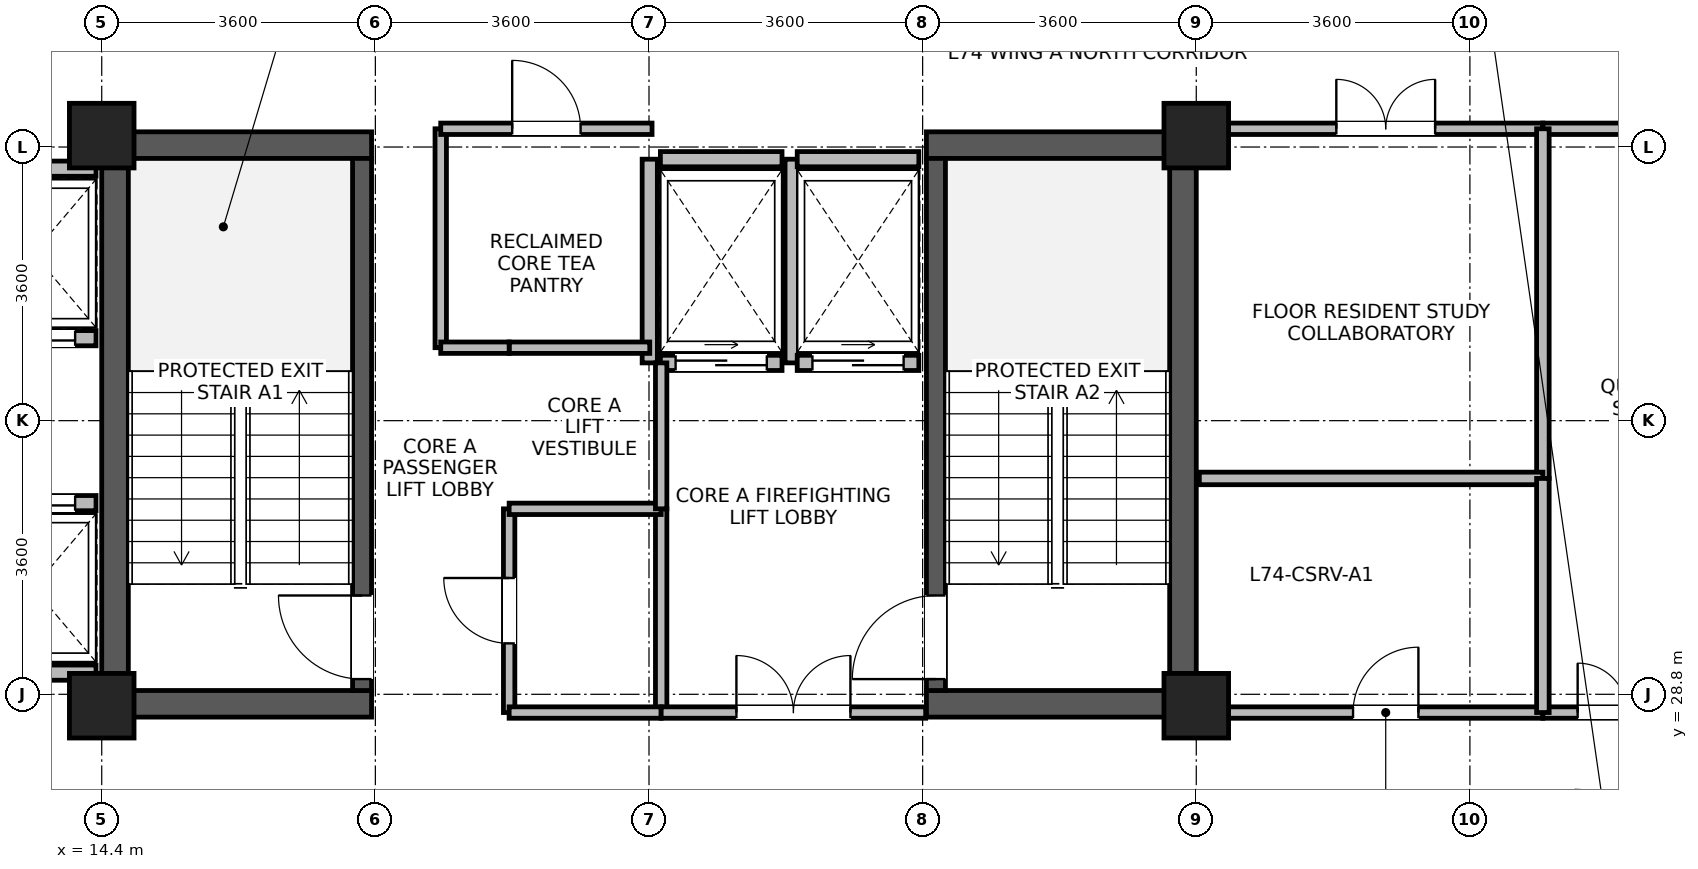
"""IFC4 building model, lengths in metres.
Left out: names, types, materials, properties, quantities, classifications, styles, units other than length and angle.
Written with IfcOpenShell. Run it as: python <this file> out.ifc"""

import sys

from ifc_helpers import new_model, si_unit, direction, frame, frame_2d, origin, origin_2d, place, context, subcontext, project, spatial, rectangle, extrude, source, transform, mapped, element, fill, save


model = new_model("IFC4")
c1 = context("Model", 3, precision=1e-05, world=origin(), true_north=direction((0.0, 1.0)))
c2 = subcontext(c1, "Body", "Model", "MODEL_VIEW")
j1 = project(units=[si_unit("LENGTHUNIT", "METRE"), si_unit("PLANEANGLEUNIT", "RADIAN")], contexts=[c1])
p1 = place(None, origin())
s1 = spatial("IfcSite", under=j1, at=p1, CompositionType="ELEMENT")
p2 = place(p1, origin())
s2 = spatial("IfcBuilding", under=s1, at=p2, CompositionType="ELEMENT")
p3 = place(p2, frame((0.0, 0.0, 286.9)))
s3 = spatial("IfcBuildingStorey", under=s2, at=p3, CompositionType="ELEMENT", Elevation=286.9)
for number, where, z_axis, x_axis in (
    (1, (14.575, 28.5, 0.0), (0.0, 0.0, 1.0), (0.0, 1.0, 0.0)),
    (2, (28.625, 28.5, 0.0), (0.0, 0.0, 1.0), (0.0, 1.0, 0.0)),
):
    element("IfcWall", number, at=place(p3, frame(where, z_axis=z_axis, x_axis=x_axis)), inside=s3, PredefinedType="SHEAR", context=c2, shape_type="SweptSolid", body=[
        extrude(rectangle(XDim=7.7, YDim=0.35, at=frame_2d((3.85, 0.0))), origin(), (0.0, 0.0, 1.0), 3.475),
    ])
for number, where, z_axis, x_axis in (
    (3, (14.75, 28.675, 0.0), (0.0, 0.0, 1.0), (1.0, 0.0, 0.0)),
    (4, (25.25, 28.675, 0.0), (0.0, 0.0, 1.0), (1.0, 0.0, 0.0)),
    (5, (14.75, 36.025, 0.0), (0.0, 0.0, 1.0), (1.0, 0.0, 0.0)),
    (6, (25.25, 36.025, 0.0), (0.0, 0.0, 1.0), (1.0, 0.0, 0.0)),
):
    element("IfcWall", number, at=place(p3, frame(where, z_axis=z_axis, x_axis=x_axis)), inside=s3, PredefinedType="SHEAR", context=c2, shape_type="SweptSolid", body=[
        extrude(rectangle(XDim=3.2, YDim=0.35, at=frame_2d((1.6, 0.0))), origin(), (0.0, 0.0, 1.0), 3.475),
    ])
p4 = place(p3, frame((17.825, 28.85, 0.0), z_axis=(0.0, 0.0, 1.0), x_axis=(0.0, 1.0, 0.0)))
e7 = element("IfcWall", 7, at=p4, inside=s3, PredefinedType="SHEAR", context=c2, shape_type="SweptSolid", body=[
    extrude(rectangle(XDim=7.0, YDim=0.25, at=frame_2d((3.5, 0.0))), origin(), (0.0, 0.0, 1.0), 3.475),
])
p5 = place(p4, frame((0.15, 0.0, 0.0)))
e8 = element("IfcOpeningElement", 8, at=p5, cuts=e7, PredefinedType="OPENING", context=c2, shape_type="SweptSolid", body=[
    extrude(rectangle(XDim=1.1, YDim=2.08, at=frame_2d((0.55, 1.04))), frame((0.0, 0.135, 0.0), z_axis=(0.0, -1.0, 0.0), x_axis=(1.0, 0.0, 0.0)), (0.0, 0.0, 1.0), 0.27),
])
p6 = place(p3, frame((25.375, 28.85, 0.0), z_axis=(0.0, 0.0, 1.0), x_axis=(0.0, 1.0, 0.0)))
e9 = element("IfcWall", 9, at=p6, inside=s3, PredefinedType="SHEAR", context=c2, shape_type="SweptSolid", body=[
    extrude(rectangle(XDim=7.0, YDim=0.25, at=frame_2d((3.5, 0.0))), origin(), (0.0, 0.0, 1.0), 3.475),
])
p7 = place(p6, frame((0.15, 0.0, 0.0)))
e10 = element("IfcOpeningElement", 10, at=p7, cuts=e9, PredefinedType="OPENING", context=c2, shape_type="SweptSolid", body=[
    extrude(rectangle(XDim=1.1, YDim=2.08, at=frame_2d((0.55, 1.04))), frame((0.0, 0.135, 0.0), z_axis=(0.0, -1.0, 0.0), x_axis=(1.0, 0.0, 0.0)), (0.0, 0.0, 1.0), 0.27),
])
m1 = source(origin(), c2, "Body", "SweptSolid", [
    extrude(rectangle(XDim=0.85, YDim=0.85, at=origin_2d()), origin(), (0.0, 0.0, 1.0), 3.7),
])
for number, where, z_axis, x_axis in (
    (11, (14.4, 28.65, 0.0), (0.0, 0.0, 1.0), (1.0, 0.0, 0.0)),
    (12, (14.4, 36.15, 0.0), (0.0, 0.0, 1.0), (1.0, 0.0, 0.0)),
    (13, (28.8, 28.65, 0.0), (0.0, 0.0, 1.0), (1.0, 0.0, 0.0)),
    (14, (28.8, 36.15, 0.0), (0.0, 0.0, 1.0), (1.0, 0.0, 0.0)),
):
    element("IfcColumn", number, at=place(p3, frame(where, z_axis=z_axis, x_axis=x_axis)), inside=s3, PredefinedType="COLUMN", context=c2, shape_type="MappedRepresentation", body=[
        mapped(m1, transform((0.0, 0.0, 0.0), x_axis=(1.0, 0.0, 0.0), y_axis=(0.0, 1.0, 0.0), z_axis=(0.0, 0.0, 1.0), scale=1.0)),
    ])
p8 = place(p3, frame((12.675, 33.485, 0.0), z_axis=(0.0, 0.0, 1.0), x_axis=(1.0, 0.0, 0.0)))
e15 = element("IfcWall", 15, at=p8, inside=s3, PredefinedType="PARTITIONING", context=c2, shape_type="SweptSolid", body=[
    extrude(rectangle(XDim=1.65, YDim=0.2, at=frame_2d((0.825, 0.0))), origin(), (0.0, 0.0, 1.0), 3.455),
])
p9 = place(p8, frame((0.275, 0.0, 0.0)))
e16 = element("IfcOpeningElement", 16, at=p9, cuts=e15, PredefinedType="OPENING", context=c2, shape_type="SweptSolid", body=[
    extrude(rectangle(XDim=1.1, YDim=2.12, at=frame_2d((0.55, 1.06))), frame((0.0, 0.11, 0.0), z_axis=(0.0, -1.0, 0.0), x_axis=(1.0, 0.0, 0.0)), (0.0, 0.0, 1.0), 0.22),
])
for number, where, z_axis, x_axis in (
    (17, (12.675, 35.715, 0.0), (0.0, 0.0, 1.0), (1.0, 0.0, 0.0)),
    (18, (12.675, 29.085, 0.0), (0.0, 0.0, 1.0), (1.0, 0.0, 0.0)),
):
    element("IfcWall", number, at=place(p3, frame(where, z_axis=z_axis, x_axis=x_axis)), inside=s3, PredefinedType="PARTITIONING", context=c2, shape_type="SweptSolid", body=[
        extrude(rectangle(XDim=1.65, YDim=0.2, at=frame_2d((0.825, 0.0))), origin(), (0.0, 0.0, 1.0), 3.455),
    ])
p10 = place(p3, frame((12.675, 31.315, 0.0), z_axis=(0.0, 0.0, 1.0), x_axis=(1.0, 0.0, 0.0)))
e19 = element("IfcWall", 19, at=p10, inside=s3, PredefinedType="PARTITIONING", context=c2, shape_type="SweptSolid", body=[
    extrude(rectangle(XDim=1.65, YDim=0.2, at=frame_2d((0.825, 0.0))), origin(), (0.0, 0.0, 1.0), 3.455),
])
p11 = place(p10, frame((0.275, 0.0, 0.0)))
e20 = element("IfcOpeningElement", 20, at=p11, cuts=e19, PredefinedType="OPENING", context=c2, shape_type="SweptSolid", body=[
    extrude(rectangle(XDim=1.1, YDim=2.12, at=frame_2d((0.55, 1.06))), frame((0.0, 0.11, 0.0), z_axis=(0.0, -1.0, 0.0), x_axis=(1.0, 0.0, 0.0)), (0.0, 0.0, 1.0), 0.22),
])
p12 = place(p3, frame((21.75, 33.16, 0.0), z_axis=(0.0, 0.0, 1.0), x_axis=(1.0, 0.0, 0.0)))
e21 = element("IfcWall", 21, at=p12, inside=s3, PredefinedType="PARTITIONING", context=c2, shape_type="SweptSolid", body=[
    extrude(rectangle(XDim=1.6, YDim=0.2, at=frame_2d((0.8, 0.0))), origin(), (0.0, 0.0, 1.0), 3.455),
])
p13 = place(p12, frame((0.2, 0.0, 0.0)))
e22 = element("IfcOpeningElement", 22, at=p13, cuts=e21, PredefinedType="OPENING", context=c2, shape_type="SweptSolid", body=[
    extrude(rectangle(XDim=1.2, YDim=2.12, at=frame_2d((0.6, 1.06))), frame((0.0, 0.11, 0.0), z_axis=(0.0, -1.0, 0.0), x_axis=(1.0, 0.0, 0.0)), (0.0, 0.0, 1.0), 0.22),
])
p14 = place(p3, frame((21.75, 35.84, 0.0), z_axis=(0.0, 0.0, 1.0), x_axis=(1.0, 0.0, 0.0)))
e23 = element("IfcWall", 23, at=p14, inside=s3, PredefinedType="PARTITIONING", context=c2, shape_type="SweptSolid", body=[
    extrude(rectangle(XDim=1.6, YDim=0.2, at=frame_2d((0.8, 0.0))), origin(), (0.0, 0.0, 1.0), 2.555),
])
for number, where, z_axis, x_axis in (
    (24, (21.61, 33.16, 0.0), (0.0, 0.0, 1.0), (0.0, 1.0, 0.0)),
    (25, (23.49, 33.16, 0.0), (0.0, 0.0, 1.0), (0.0, 1.0, 0.0)),
):
    element("IfcWall", number, at=place(p3, frame(where, z_axis=z_axis, x_axis=x_axis)), inside=s3, PredefinedType="PARTITIONING", context=c2, shape_type="SweptSolid", body=[
        extrude(rectangle(XDim=2.68, YDim=0.2, at=frame_2d((1.34, 0.0))), origin(), (0.0, 0.0, 1.0), 3.455),
    ])
p15 = place(p3, frame((23.55, 33.16, 0.0), z_axis=(0.0, 0.0, 1.0), x_axis=(1.0, 0.0, 0.0)))
e26 = element("IfcWall", 26, at=p15, inside=s3, PredefinedType="PARTITIONING", context=c2, shape_type="SweptSolid", body=[
    extrude(rectangle(XDim=1.6, YDim=0.2, at=frame_2d((0.8, 0.0))), origin(), (0.0, 0.0, 1.0), 3.455),
])
p16 = place(p15, frame((0.2, 0.0, 0.0)))
e27 = element("IfcOpeningElement", 27, at=p16, cuts=e26, PredefinedType="OPENING", context=c2, shape_type="SweptSolid", body=[
    extrude(rectangle(XDim=1.2, YDim=2.12, at=frame_2d((0.6, 1.06))), frame((0.0, 0.11, 0.0), z_axis=(0.0, -1.0, 0.0), x_axis=(1.0, 0.0, 0.0)), (0.0, 0.0, 1.0), 0.22),
])
p17 = place(p3, frame((23.55, 35.84, 0.0), z_axis=(0.0, 0.0, 1.0), x_axis=(1.0, 0.0, 0.0)))
e28 = element("IfcWall", 28, at=p17, inside=s3, PredefinedType="PARTITIONING", context=c2, shape_type="SweptSolid", body=[
    extrude(rectangle(XDim=1.6, YDim=0.2, at=frame_2d((0.8, 0.0))), origin(), (0.0, 0.0, 1.0), 2.555),
])
p18 = place(p3, frame((29.225, 28.56, 0.0), z_axis=(0.0, 0.0, 1.0), x_axis=(1.0, 0.0, 0.0)))
e29 = element("IfcWall", 29, at=p18, inside=s3, PredefinedType="PARTITIONING", context=c2, shape_type="SweptSolid", body=[
    extrude(rectangle(XDim=4.135, YDim=0.15, at=frame_2d((2.067, 0.0))), origin(), (0.0, 0.0, 1.0), 2.905),
])
p19 = place(p18, frame((1.637, 0.0, 0.0)))
e30 = element("IfcOpeningElement", 30, at=p19, cuts=e29, PredefinedType="OPENING", context=c2, shape_type="SweptSolid", body=[
    extrude(rectangle(XDim=0.86, YDim=2.02, at=frame_2d((0.43, 1.01))), frame((0.0, 0.085, 0.0), z_axis=(0.0, -1.0, 0.0), x_axis=(1.0, 0.0, 0.0)), (0.0, 0.0, 1.0), 0.17),
])
p20 = place(p3, frame((29.225, 36.24, 0.0), z_axis=(0.0, 0.0, 1.0), x_axis=(1.0, 0.0, 0.0)))
e31 = element("IfcWall", 31, at=p20, inside=s3, PredefinedType="PARTITIONING", context=c2, shape_type="SweptSolid", body=[
    extrude(rectangle(XDim=4.135, YDim=0.15, at=frame_2d((2.067, 0.0))), origin(), (0.0, 0.0, 1.0), 2.905),
])
p21 = place(p20, frame((1.417, 0.0, 0.0)))
e32 = element("IfcOpeningElement", 32, at=p21, cuts=e31, PredefinedType="OPENING", context=c2, shape_type="SweptSolid", body=[
    extrude(rectangle(XDim=1.3, YDim=2.12, at=frame_2d((0.65, 1.06))), frame((0.0, 0.085, 0.0), z_axis=(0.0, -1.0, 0.0), x_axis=(1.0, 0.0, 0.0)), (0.0, 0.0, 1.0), 0.17),
])
p22 = place(p3, frame((33.36, 28.56, 0.0), z_axis=(0.0, 0.0, 1.0), x_axis=(1.0, 0.0, 0.0)))
e33 = element("IfcWall", 33, at=p22, inside=s3, PredefinedType="PARTITIONING", context=c2, shape_type="SweptSolid", body=[
    extrude(rectangle(XDim=2.215, YDim=0.15, at=frame_2d((1.107, 0.0))), origin(), (0.0, 0.0, 1.0), 2.905),
])
p23 = place(p22, frame((0.458, 0.0, 0.0)))
e34 = element("IfcOpeningElement", 34, at=p23, cuts=e33, PredefinedType="OPENING", context=c2, shape_type="SweptSolid", body=[
    extrude(rectangle(XDim=1.3, YDim=2.12, at=frame_2d((0.65, 1.06))), frame((0.0, 0.085, 0.0), z_axis=(0.0, -1.0, 0.0), x_axis=(1.0, 0.0, 0.0)), (0.0, 0.0, 1.0), 0.17),
])
p24 = place(p3, frame((33.36, 36.24, 0.0), z_axis=(0.0, 0.0, 1.0), x_axis=(1.0, 0.0, 0.0)))
e35 = element("IfcWall", 35, at=p24, inside=s3, PredefinedType="PARTITIONING", context=c2, shape_type="SweptSolid", body=[
    extrude(rectangle(XDim=2.215, YDim=0.15, at=frame_2d((1.107, 0.0))), origin(), (0.0, 0.0, 1.0), 2.905),
])
p25 = place(p3, frame((18.86, 33.36, 0.0), z_axis=(0.0, 0.0, 1.0), x_axis=(0.0, 1.0, 0.0)))
e36 = element("IfcWall", 36, at=p25, inside=s3, PredefinedType="PARTITIONING", context=c2, shape_type="SweptSolid", body=[
    extrude(rectangle(XDim=2.88, YDim=0.15, at=frame_2d((1.44, 0.0))), origin(), (0.0, 0.0, 1.0), 3.455),
])
p26 = place(p3, frame((18.86, 36.24, 0.0), z_axis=(0.0, 0.0, 1.0), x_axis=(1.0, 0.0, 0.0)))
e37 = element("IfcWall", 37, at=p26, inside=s3, PredefinedType="PARTITIONING", context=c2, shape_type="SweptSolid", body=[
    extrude(rectangle(XDim=2.78, YDim=0.15, at=frame_2d((1.39, 0.0))), origin(), (0.0, 0.0, 1.0), 2.555),
])
p27 = place(p26, frame((0.94, 0.0, 0.0)))
e38 = element("IfcOpeningElement", 38, at=p27, cuts=e37, PredefinedType="OPENING", context=c2, shape_type="SweptSolid", body=[
    extrude(rectangle(XDim=0.9, YDim=2.08, at=frame_2d((0.45, 1.04))), frame((0.0, 0.085, 0.0), z_axis=(0.0, -1.0, 0.0), x_axis=(1.0, 0.0, 0.0)), (0.0, 0.0, 1.0), 0.17),
])
p28 = place(p3, frame((19.76, 28.56, 0.0), z_axis=(0.0, 0.0, 1.0), x_axis=(0.0, 1.0, 0.0)))
e39 = element("IfcWall", 39, at=p28, inside=s3, PredefinedType="PARTITIONING", context=c2, shape_type="SweptSolid", body=[
    extrude(rectangle(XDim=2.68, YDim=0.15, at=frame_2d((1.34, 0.0))), origin(), (0.0, 0.0, 1.0), 3.455),
])
p29 = place(p28, frame((0.91, 0.0, 0.0)))
e40 = element("IfcOpeningElement", 40, at=p29, cuts=e39, PredefinedType="OPENING", context=c2, shape_type="SweptSolid", body=[
    extrude(rectangle(XDim=0.86, YDim=2.02, at=frame_2d((0.43, 1.01))), frame((0.0, 0.085, 0.0), z_axis=(0.0, -1.0, 0.0), x_axis=(1.0, 0.0, 0.0)), (0.0, 0.0, 1.0), 0.17),
])
p30 = place(p3, frame((21.76, 28.56, 0.0), z_axis=(0.0, 0.0, 1.0), x_axis=(0.0, 1.0, 0.0)))
e41 = element("IfcWall", 41, at=p30, inside=s3, PredefinedType="PARTITIONING", context=c2, shape_type="SweptSolid", body=[
    extrude(rectangle(XDim=2.68, YDim=0.15, at=frame_2d((1.34, 0.0))), origin(), (0.0, 0.0, 1.0), 3.455),
])
p31 = place(p3, frame((19.76, 28.56, 0.0), z_axis=(0.0, 0.0, 1.0), x_axis=(1.0, 0.0, 0.0)))
e42 = element("IfcWall", 42, at=p31, inside=s3, PredefinedType="PARTITIONING", context=c2, shape_type="SweptSolid", body=[
    extrude(rectangle(XDim=2.0, YDim=0.15, at=frame_2d((1.0, 0.0))), origin(), (0.0, 0.0, 1.0), 2.555),
])
p32 = place(p3, frame((19.76, 31.24, 0.0), z_axis=(0.0, 0.0, 1.0), x_axis=(1.0, 0.0, 0.0)))
e43 = element("IfcWall", 43, at=p32, inside=s3, PredefinedType="PARTITIONING", context=c2, shape_type="SweptSolid", body=[
    extrude(rectangle(XDim=2.0, YDim=0.15, at=frame_2d((1.0, 0.0))), origin(), (0.0, 0.0, 1.0), 3.455),
])
p33 = place(p3, frame((19.76, 33.36, 0.0), z_axis=(0.0, 0.0, 1.0), x_axis=(1.0, 0.0, 0.0)))
e44 = element("IfcWall", 44, at=p33, inside=s3, PredefinedType="PARTITIONING", context=c2, shape_type="SweptSolid", body=[
    extrude(rectangle(XDim=1.85, YDim=0.15, at=frame_2d((0.925, 0.0))), origin(), (0.0, 0.0, 1.0), 3.455),
])
p34 = place(p3, frame((18.86, 33.36, 0.0), z_axis=(0.0, 0.0, 1.0), x_axis=(1.0, 0.0, 0.0)))
e45 = element("IfcWall", 45, at=p34, inside=s3, PredefinedType="PARTITIONING", context=c2, shape_type="SweptSolid", body=[
    extrude(rectangle(XDim=0.9, YDim=0.15, at=frame_2d((0.45, 0.0))), origin(), (0.0, 0.0, 1.0), 3.455),
])
p35 = place(p3, frame((33.36, 31.64, 0.0), z_axis=(0.0, 0.0, 1.0), x_axis=(0.0, 1.0, 0.0)))
e46 = element("IfcWall", 46, at=p35, inside=s3, PredefinedType="PARTITIONING", context=c2, shape_type="SweptSolid", body=[
    extrude(rectangle(XDim=4.6, YDim=0.165, at=frame_2d((2.3, 0.0))), origin(), (0.0, 0.0, 1.0), 3.455),
])
p36 = place(p3, frame((28.84, 31.64, 0.0), z_axis=(0.0, 0.0, 1.0), x_axis=(1.0, 0.0, 0.0)))
e47 = element("IfcWall", 47, at=p36, inside=s3, PredefinedType="PARTITIONING", context=c2, shape_type="SweptSolid", body=[
    extrude(rectangle(XDim=4.52, YDim=0.165, at=frame_2d((2.26, 0.0))), origin(), (0.0, 0.0, 1.0), 3.455),
])
p37 = place(p3, frame((21.76, 28.56, 0.0), z_axis=(0.0, 0.0, 1.0), x_axis=(1.0, 0.0, 0.0)))
e48 = element("IfcWall", 48, at=p37, inside=s3, PredefinedType="PARTITIONING", context=c2, shape_type="SweptSolid", body=[
    extrude(rectangle(XDim=3.48, YDim=0.15, at=frame_2d((1.74, 0.0))), origin(), (0.0, 0.0, 1.0), 2.555),
])
p38 = place(p37, frame((0.99, 0.0, 0.0)))
e49 = element("IfcOpeningElement", 49, at=p38, cuts=e48, PredefinedType="OPENING", context=c2, shape_type="SweptSolid", body=[
    extrude(rectangle(XDim=1.5, YDim=2.1, at=frame_2d((0.75, 1.05))), frame((0.0, 0.085, 0.0), z_axis=(0.0, -1.0, 0.0), x_axis=(1.0, 0.0, 0.0)), (0.0, 0.0, 1.0), 0.17),
])
p39 = place(p3, frame((33.36, 28.56, 0.0), z_axis=(0.0, 0.0, 1.0), x_axis=(0.0, 1.0, 0.0)))
e50 = element("IfcWall", 50, at=p39, inside=s3, PredefinedType="PARTITIONING", context=c2, shape_type="SweptSolid", body=[
    extrude(rectangle(XDim=3.08, YDim=0.165, at=frame_2d((1.54, 0.0))), origin(), (0.0, 0.0, 1.0), 3.455),
])
p40 = place(p3, frame((21.76, 31.24, 0.0), z_axis=(0.0, 0.0, 1.0), x_axis=(0.0, 1.0, 0.0)))
e51 = element("IfcWall", 51, at=p40, inside=s3, PredefinedType="PARTITIONING", context=c2, shape_type="SweptSolid", body=[
    extrude(rectangle(XDim=1.92, YDim=0.15, at=frame_2d((0.96, 0.0))), origin(), (0.0, 0.0, 1.0), 3.455),
])
p41 = place(p5, origin())
e52 = element("IfcDoor", 52, at=p41, inside=s3, OperationType="SINGLE_SWING_RIGHT", PredefinedType="DOOR", context=c2, shape_type="SweptSolid", body=[
    extrude(rectangle(XDim=1.1, YDim=2.08, at=frame_2d((0.55, 1.04))), frame((0.0, 0.025, 0.0), z_axis=(0.0, -1.0, 0.0), x_axis=(1.0, 0.0, 0.0)), (0.0, 0.0, 1.0), 0.05),
])
fill(e8, e52)
p42 = place(p7, origin())
e53 = element("IfcDoor", 53, at=p42, inside=s3, OperationType="SINGLE_SWING_LEFT", PredefinedType="DOOR", context=c2, shape_type="SweptSolid", body=[
    extrude(rectangle(XDim=1.1, YDim=2.08, at=frame_2d((0.55, 1.04))), frame((0.0, 0.025, 0.0), z_axis=(0.0, -1.0, 0.0), x_axis=(1.0, 0.0, 0.0)), (0.0, 0.0, 1.0), 0.05),
])
fill(e10, e53)
p43 = place(p9, origin())
e54 = element("IfcDoor", 54, at=p43, inside=s3, OperationType="SLIDING_TO_LEFT", PredefinedType="DOOR", context=c2, shape_type="SweptSolid", body=[
    extrude(rectangle(XDim=1.1, YDim=2.12, at=frame_2d((0.55, 1.06))), frame((0.0, 0.025, 0.0), z_axis=(0.0, -1.0, 0.0), x_axis=(1.0, 0.0, 0.0)), (0.0, 0.0, 1.0), 0.05),
])
fill(e16, e54)
p44 = place(p11, origin())
e55 = element("IfcDoor", 55, at=p44, inside=s3, OperationType="SLIDING_TO_LEFT", PredefinedType="DOOR", context=c2, shape_type="SweptSolid", body=[
    extrude(rectangle(XDim=1.1, YDim=2.12, at=frame_2d((0.55, 1.06))), frame((0.0, 0.025, 0.0), z_axis=(0.0, -1.0, 0.0), x_axis=(1.0, 0.0, 0.0)), (0.0, 0.0, 1.0), 0.05),
])
fill(e20, e55)
p45 = place(p13, origin())
e56 = element("IfcDoor", 56, at=p45, inside=s3, OperationType="SLIDING_TO_RIGHT", PredefinedType="DOOR", context=c2, shape_type="SweptSolid", body=[
    extrude(rectangle(XDim=1.2, YDim=2.12, at=frame_2d((0.6, 1.06))), frame((0.0, 0.025, 0.0), z_axis=(0.0, -1.0, 0.0), x_axis=(1.0, 0.0, 0.0)), (0.0, 0.0, 1.0), 0.05),
])
fill(e22, e56)
p46 = place(p16, origin())
e57 = element("IfcDoor", 57, at=p46, inside=s3, OperationType="SLIDING_TO_RIGHT", PredefinedType="DOOR", context=c2, shape_type="SweptSolid", body=[
    extrude(rectangle(XDim=1.2, YDim=2.12, at=frame_2d((0.6, 1.06))), frame((0.0, 0.025, 0.0), z_axis=(0.0, -1.0, 0.0), x_axis=(1.0, 0.0, 0.0)), (0.0, 0.0, 1.0), 0.05),
])
fill(e27, e57)
p47 = place(p19, origin())
e58 = element("IfcDoor", 58, at=p47, inside=s3, OperationType="SINGLE_SWING_RIGHT", PredefinedType="DOOR", context=c2, shape_type="SweptSolid", body=[
    extrude(rectangle(XDim=0.86, YDim=2.02, at=frame_2d((0.43, 1.01))), frame((0.0, 0.025, 0.0), z_axis=(0.0, -1.0, 0.0), x_axis=(1.0, 0.0, 0.0)), (0.0, 0.0, 1.0), 0.05),
])
fill(e30, e58)
p48 = place(p21, origin())
e59 = element("IfcDoor", 59, at=p48, inside=s3, OperationType="DOUBLE_DOOR_SINGLE_SWING", PredefinedType="DOOR", context=c2, shape_type="SweptSolid", body=[
    extrude(rectangle(XDim=1.3, YDim=2.12, at=frame_2d((0.65, 1.06))), frame((0.0, 0.025, 0.0), z_axis=(0.0, -1.0, 0.0), x_axis=(1.0, 0.0, 0.0)), (0.0, 0.0, 1.0), 0.05),
])
fill(e32, e59)
p49 = place(p23, origin())
e60 = element("IfcDoor", 60, at=p49, inside=s3, OperationType="DOUBLE_DOOR_SINGLE_SWING", PredefinedType="DOOR", context=c2, shape_type="SweptSolid", body=[
    extrude(rectangle(XDim=1.3, YDim=2.12, at=frame_2d((0.65, 1.06))), frame((0.0, 0.025, 0.0), z_axis=(0.0, -1.0, 0.0), x_axis=(1.0, 0.0, 0.0)), (0.0, 0.0, 1.0), 0.05),
])
fill(e34, e60)
p50 = place(p27, origin())
e61 = element("IfcDoor", 61, at=p50, inside=s3, OperationType="SINGLE_SWING_LEFT", PredefinedType="DOOR", context=c2, shape_type="SweptSolid", body=[
    extrude(rectangle(XDim=0.9, YDim=2.08, at=frame_2d((0.45, 1.04))), frame((0.0, 0.025, 0.0), z_axis=(0.0, -1.0, 0.0), x_axis=(1.0, 0.0, 0.0)), (0.0, 0.0, 1.0), 0.05),
])
fill(e38, e61)
p51 = place(p29, origin())
e62 = element("IfcDoor", 62, at=p51, inside=s3, OperationType="SINGLE_SWING_RIGHT", PredefinedType="DOOR", context=c2, shape_type="SweptSolid", body=[
    extrude(rectangle(XDim=0.86, YDim=2.02, at=frame_2d((0.43, 1.01))), frame((0.0, 0.025, 0.0), z_axis=(0.0, -1.0, 0.0), x_axis=(1.0, 0.0, 0.0)), (0.0, 0.0, 1.0), 0.05),
])
fill(e40, e62)
p52 = place(p38, origin())
e63 = element("IfcDoor", 63, at=p52, inside=s3, OperationType="DOUBLE_DOOR_SINGLE_SWING", PredefinedType="DOOR", context=c2, shape_type="SweptSolid", body=[
    extrude(rectangle(XDim=1.5, YDim=2.1, at=frame_2d((0.75, 1.05))), frame((0.0, 0.025, 0.0), z_axis=(0.0, -1.0, 0.0), x_axis=(1.0, 0.0, 0.0)), (0.0, 0.0, 1.0), 0.05),
])
fill(e49, e63)
save(model, sys.argv[1])
